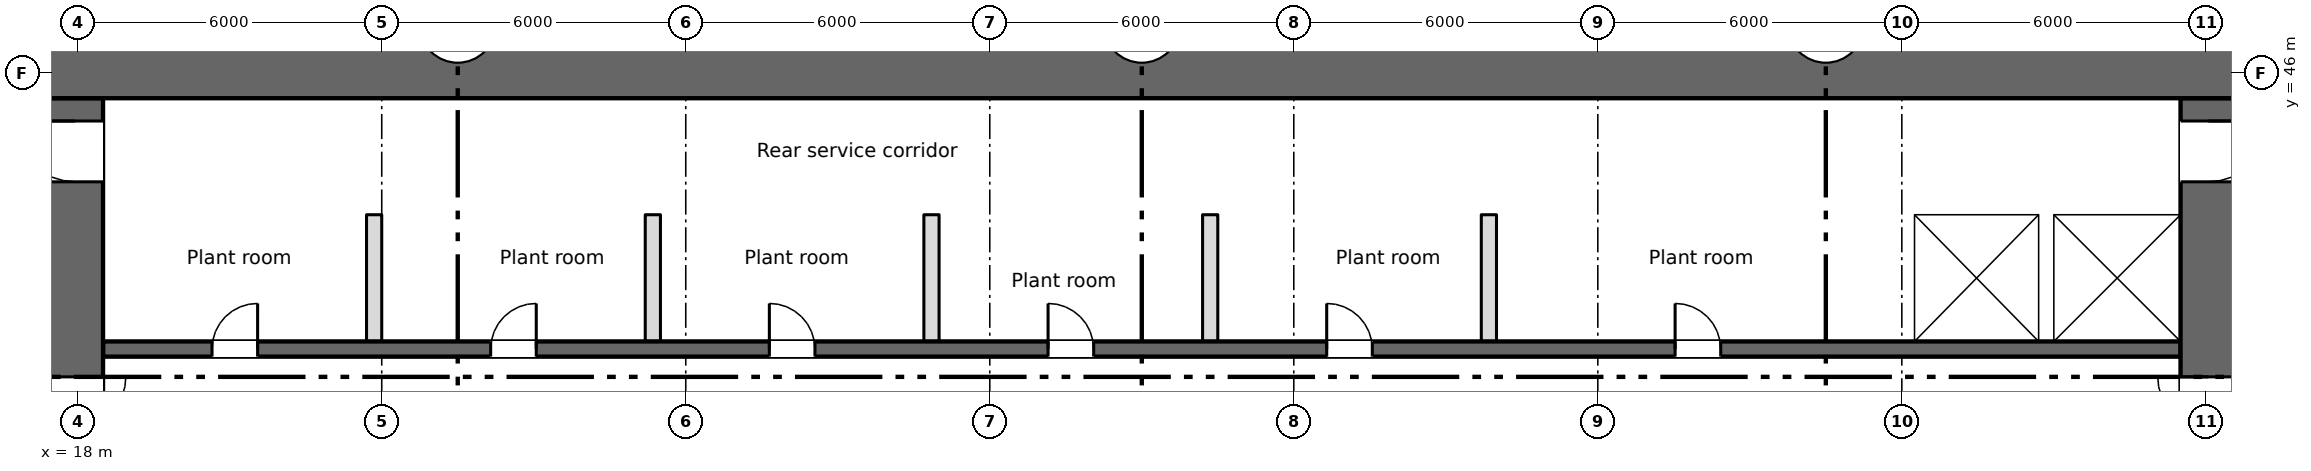
"""IFC4 building model, lengths in metres.
Left out: names, types, materials, properties, quantities, classifications, styles, units other than length and angle.
Written with IfcOpenShell. Run it as: python <this file> out.ifc"""

import sys

from ifc_helpers import new_model, si_unit, direction, frame, frame_2d, origin, place, context, subcontext, project, spatial, rectangle, extrude, element, fill, save


model = new_model("IFC4")
c1 = context("Model", 3, precision=1e-05, world=origin(), true_north=direction((0.0, 1.0)))
c2 = subcontext(c1, "Body", "Model", "MODEL_VIEW")
j1 = project(units=[si_unit("LENGTHUNIT", "METRE"), si_unit("PLANEANGLEUNIT", "RADIAN")], contexts=[c1])
p1 = place(None, origin())
s1 = spatial("IfcSite", under=j1, at=p1, CompositionType="ELEMENT")
p2 = place(p1, origin())
s2 = spatial("IfcBuilding", under=s1, at=p2, CompositionType="ELEMENT")
p3 = place(p2, frame((0.0, 0.0, -6.0)))
s3 = spatial("IfcBuildingStorey", under=s2, at=p3, CompositionType="ELEMENT", Elevation=-6.0)
p4 = place(p3, frame((-2.0, 46.0, 0.0), z_axis=(0.0, 0.0, 1.0), x_axis=(1.0, 0.0, 0.0)))
e1 = element("IfcWall", 1, at=p4, inside=s3, PredefinedType="SOLIDWALL", context=c2, shape_type="SweptSolid", body=[
    extrude(rectangle(XDim=82.0, YDim=1.0, at=frame_2d((41.0, 0.0))), origin(), (0.0, 0.0, 1.0), 5.55),
])
p5 = place(p3, frame((17.95, 28.4, 0.0), z_axis=(0.0, 0.0, 1.0), x_axis=(0.0, 1.0, 0.0)))
e2 = element("IfcWall", 2, at=p5, inside=s3, PredefinedType="SHEAR", context=c2, shape_type="SweptSolid", body=[
    extrude(rectangle(XDim=17.1, YDim=1.1, at=frame_2d((8.55, 0.0))), origin(), (0.0, 0.0, 1.0), 5.55),
])
p6 = place(p5, frame((9.6, 0.0, 0.0)))
e3 = element("IfcOpeningElement", 3, at=p6, cuts=e2, PredefinedType="OPENING", context=c2, shape_type="SweptSolid", body=[
    extrude(rectangle(XDim=2.0, YDim=2.1, at=frame_2d((1.0, 1.05))), frame((0.0, 0.56, 0.0), z_axis=(0.0, -1.0, 0.0), x_axis=(1.0, 0.0, 0.0)), (0.0, 0.0, 1.0), 1.12),
])
p7 = place(p5, frame((15.45, 0.0, 0.0)))
e4 = element("IfcOpeningElement", 4, at=p7, cuts=e2, PredefinedType="OPENING", context=c2, shape_type="SweptSolid", body=[
    extrude(rectangle(XDim=1.2, YDim=2.1, at=frame_2d((0.6, 1.05))), frame((0.0, 0.56, 0.0), z_axis=(0.0, -1.0, 0.0), x_axis=(1.0, 0.0, 0.0)), (0.0, 0.0, 1.0), 1.12),
])
p8 = place(p3, frame((60.05, 28.4, 0.0), z_axis=(0.0, 0.0, 1.0), x_axis=(0.0, 1.0, 0.0)))
e5 = element("IfcWall", 5, at=p8, inside=s3, PredefinedType="SHEAR", context=c2, shape_type="SweptSolid", body=[
    extrude(rectangle(XDim=17.1, YDim=1.1, at=frame_2d((8.55, 0.0))), origin(), (0.0, 0.0, 1.0), 5.55),
])
p9 = place(p8, frame((9.6, 0.0, 0.0)))
e6 = element("IfcOpeningElement", 6, at=p9, cuts=e5, PredefinedType="OPENING", context=c2, shape_type="SweptSolid", body=[
    extrude(rectangle(XDim=2.0, YDim=2.1, at=frame_2d((1.0, 1.05))), frame((0.0, 0.56, 0.0), z_axis=(0.0, -1.0, 0.0), x_axis=(1.0, 0.0, 0.0)), (0.0, 0.0, 1.0), 1.12),
])
p10 = place(p8, frame((15.45, 0.0, 0.0)))
e7 = element("IfcOpeningElement", 7, at=p10, cuts=e5, PredefinedType="OPENING", context=c2, shape_type="SweptSolid", body=[
    extrude(rectangle(XDim=1.2, YDim=2.1, at=frame_2d((0.6, 1.05))), frame((0.0, 0.56, 0.0), z_axis=(0.0, -1.0, 0.0), x_axis=(1.0, 0.0, 0.0)), (0.0, 0.0, 1.0), 1.12),
])
p11 = place(p3, frame((18.5, 40.55, 0.0), z_axis=(0.0, 0.0, 1.0), x_axis=(1.0, 0.0, 0.0)))
e8 = element("IfcWall", 8, at=p11, inside=s3, PredefinedType="SHEAR", context=c2, shape_type="SweptSolid", body=[
    extrude(rectangle(XDim=41.0, YDim=0.3, at=frame_2d((20.5, 0.0))), origin(), (0.0, 0.0, 1.0), 5.55),
])
p12 = place(p11, frame((2.15, 0.0, 0.0)))
e9 = element("IfcOpeningElement", 9, at=p12, cuts=e8, PredefinedType="OPENING", context=c2, shape_type="SweptSolid", body=[
    extrude(rectangle(XDim=0.9, YDim=2.1, at=frame_2d((0.45, 1.05))), frame((0.0, 0.16, 0.0), z_axis=(0.0, -1.0, 0.0), x_axis=(1.0, 0.0, 0.0)), (0.0, 0.0, 1.0), 0.32),
])
p13 = place(p11, frame((7.65, 0.0, 0.0)))
e10 = element("IfcOpeningElement", 10, at=p13, cuts=e8, PredefinedType="OPENING", context=c2, shape_type="SweptSolid", body=[
    extrude(rectangle(XDim=0.9, YDim=2.1, at=frame_2d((0.45, 1.05))), frame((0.0, 0.16, 0.0), z_axis=(0.0, -1.0, 0.0), x_axis=(1.0, 0.0, 0.0)), (0.0, 0.0, 1.0), 0.32),
])
p14 = place(p11, frame((13.15, 0.0, 0.0)))
e11 = element("IfcOpeningElement", 11, at=p14, cuts=e8, PredefinedType="OPENING", context=c2, shape_type="SweptSolid", body=[
    extrude(rectangle(XDim=0.9, YDim=2.1, at=frame_2d((0.45, 1.05))), frame((0.0, 0.16, 0.0), z_axis=(0.0, -1.0, 0.0), x_axis=(1.0, 0.0, 0.0)), (0.0, 0.0, 1.0), 0.32),
])
p15 = place(p11, frame((18.65, 0.0, 0.0)))
e12 = element("IfcOpeningElement", 12, at=p15, cuts=e8, PredefinedType="OPENING", context=c2, shape_type="SweptSolid", body=[
    extrude(rectangle(XDim=0.9, YDim=2.1, at=frame_2d((0.45, 1.05))), frame((0.0, 0.16, 0.0), z_axis=(0.0, -1.0, 0.0), x_axis=(1.0, 0.0, 0.0)), (0.0, 0.0, 1.0), 0.32),
])
p16 = place(p11, frame((24.15, 0.0, 0.0)))
e13 = element("IfcOpeningElement", 13, at=p16, cuts=e8, PredefinedType="OPENING", context=c2, shape_type="SweptSolid", body=[
    extrude(rectangle(XDim=0.9, YDim=2.1, at=frame_2d((0.45, 1.05))), frame((0.0, 0.16, 0.0), z_axis=(0.0, -1.0, 0.0), x_axis=(1.0, 0.0, 0.0)), (0.0, 0.0, 1.0), 0.32),
])
p17 = place(p11, frame((31.025, 0.0, 0.0)))
e14 = element("IfcOpeningElement", 14, at=p17, cuts=e8, PredefinedType="OPENING", context=c2, shape_type="SweptSolid", body=[
    extrude(rectangle(XDim=0.9, YDim=2.1, at=frame_2d((0.45, 1.05))), frame((0.0, 0.16, 0.0), z_axis=(0.0, -1.0, 0.0), x_axis=(1.0, 0.0, 0.0)), (0.0, 0.0, 1.0), 0.32),
])
p18 = place(p11, frame((36.375, 0.0, 0.0)))
e15 = element("IfcOpeningElement", 15, at=p18, cuts=e8, PredefinedType="OPENING", context=c2, shape_type="SweptSolid", body=[
    extrude(rectangle(XDim=1.2, YDim=2.1, at=frame_2d((0.6, 1.05))), frame((0.0, 0.16, 0.0), z_axis=(0.0, -1.0, 0.0), x_axis=(1.0, 0.0, 0.0)), (0.0, 0.0, 1.0), 0.32),
])
p19 = place(p11, frame((39.15, 0.0, 0.0)))
e16 = element("IfcOpeningElement", 16, at=p19, cuts=e8, PredefinedType="OPENING", context=c2, shape_type="SweptSolid", body=[
    extrude(rectangle(XDim=1.2, YDim=2.1, at=frame_2d((0.6, 1.05))), frame((0.0, 0.16, 0.0), z_axis=(0.0, -1.0, 0.0), x_axis=(1.0, 0.0, 0.0)), (0.0, 0.0, 1.0), 0.32),
])
p20 = place(p3, frame((18.5, 43.35, 0.0), z_axis=(0.0, 0.0, 1.0), x_axis=(1.0, 0.0, 0.0)))
e17 = element("IfcWall", 17, at=p20, inside=s3, PredefinedType="SHEAR", context=c2, shape_type="SweptSolid", body=[
    extrude(rectangle(XDim=41.0, YDim=0.3, at=frame_2d((20.5, 0.0))), origin(), (0.0, 0.0, 1.0), 5.55),
])
for number, where, z_axis, x_axis in (
    (18, (54.1, 40.7, 0.0), (0.0, 0.0, 1.0), (0.0, 1.0, 0.0)),
    (19, (56.85, 40.7, 0.0), (0.0, 0.0, 1.0), (0.0, 1.0, 0.0)),
):
    element("IfcWall", number, at=place(p3, frame(where, z_axis=z_axis, x_axis=x_axis)), inside=s3, PredefinedType="SHEAR", context=c2, shape_type="SweptSolid", body=[
        extrude(rectangle(XDim=2.5, YDim=0.3, at=frame_2d((1.25, 0.0))), origin(), (0.0, 0.0, 1.0), 5.55),
    ])
for number, where, z_axis, x_axis in (
    (20, (23.85, 40.7, 0.0), (0.0, 0.0, 1.0), (0.0, 1.0, 0.0)),
    (21, (29.35, 40.7, 0.0), (0.0, 0.0, 1.0), (0.0, 1.0, 0.0)),
    (22, (34.85, 40.7, 0.0), (0.0, 0.0, 1.0), (0.0, 1.0, 0.0)),
    (23, (40.35, 40.7, 0.0), (0.0, 0.0, 1.0), (0.0, 1.0, 0.0)),
    (24, (45.85, 40.7, 0.0), (0.0, 0.0, 1.0), (0.0, 1.0, 0.0)),
):
    element("IfcWall", number, at=place(p3, frame(where, z_axis=z_axis, x_axis=x_axis)), inside=s3, PredefinedType="PARTITIONING", context=c2, shape_type="SweptSolid", body=[
        extrude(rectangle(XDim=2.5, YDim=0.3, at=frame_2d((1.25, 0.0))), origin(), (0.0, 0.0, 1.0), 5.55),
    ])
p21 = place(p12, origin())
e25 = element("IfcDoor", 25, at=p21, inside=s3, OperationType="SINGLE_SWING_RIGHT", PredefinedType="DOOR", context=c2, shape_type="SweptSolid", body=[
    extrude(rectangle(XDim=0.9, YDim=2.1, at=frame_2d((0.45, 1.05))), frame((0.0, 0.025, 0.0), z_axis=(0.0, -1.0, 0.0), x_axis=(1.0, 0.0, 0.0)), (0.0, 0.0, 1.0), 0.05),
])
fill(e9, e25)
p22 = place(p13, origin())
e26 = element("IfcDoor", 26, at=p22, inside=s3, OperationType="SINGLE_SWING_RIGHT", PredefinedType="DOOR", context=c2, shape_type="SweptSolid", body=[
    extrude(rectangle(XDim=0.9, YDim=2.1, at=frame_2d((0.45, 1.05))), frame((0.0, 0.025, 0.0), z_axis=(0.0, -1.0, 0.0), x_axis=(1.0, 0.0, 0.0)), (0.0, 0.0, 1.0), 0.05),
])
fill(e10, e26)
p23 = place(p14, origin())
e27 = element("IfcDoor", 27, at=p23, inside=s3, OperationType="SINGLE_SWING_LEFT", PredefinedType="DOOR", context=c2, shape_type="SweptSolid", body=[
    extrude(rectangle(XDim=0.9, YDim=2.1, at=frame_2d((0.45, 1.05))), frame((0.0, 0.025, 0.0), z_axis=(0.0, -1.0, 0.0), x_axis=(1.0, 0.0, 0.0)), (0.0, 0.0, 1.0), 0.05),
])
fill(e11, e27)
p24 = place(p15, origin())
e28 = element("IfcDoor", 28, at=p24, inside=s3, OperationType="SINGLE_SWING_LEFT", PredefinedType="DOOR", context=c2, shape_type="SweptSolid", body=[
    extrude(rectangle(XDim=0.9, YDim=2.1, at=frame_2d((0.45, 1.05))), frame((0.0, 0.025, 0.0), z_axis=(0.0, -1.0, 0.0), x_axis=(1.0, 0.0, 0.0)), (0.0, 0.0, 1.0), 0.05),
])
fill(e12, e28)
p25 = place(p16, origin())
e29 = element("IfcDoor", 29, at=p25, inside=s3, OperationType="SINGLE_SWING_LEFT", PredefinedType="DOOR", context=c2, shape_type="SweptSolid", body=[
    extrude(rectangle(XDim=0.9, YDim=2.1, at=frame_2d((0.45, 1.05))), frame((0.0, 0.025, 0.0), z_axis=(0.0, -1.0, 0.0), x_axis=(1.0, 0.0, 0.0)), (0.0, 0.0, 1.0), 0.05),
])
fill(e13, e29)
p26 = place(p17, origin())
e30 = element("IfcDoor", 30, at=p26, inside=s3, OperationType="SINGLE_SWING_LEFT", PredefinedType="DOOR", context=c2, shape_type="SweptSolid", body=[
    extrude(rectangle(XDim=0.9, YDim=2.1, at=frame_2d((0.45, 1.05))), frame((0.0, 0.025, 0.0), z_axis=(0.0, -1.0, 0.0), x_axis=(1.0, 0.0, 0.0)), (0.0, 0.0, 1.0), 0.05),
])
fill(e14, e30)
p27 = place(p18, origin())
e31 = element("IfcDoor", 31, at=p27, inside=s3, OperationType="SLIDING_TO_LEFT", PredefinedType="DOOR", context=c2, shape_type="SweptSolid", body=[
    extrude(rectangle(XDim=1.2, YDim=2.1, at=frame_2d((0.6, 1.05))), frame((0.0, 0.025, 0.0), z_axis=(0.0, -1.0, 0.0), x_axis=(1.0, 0.0, 0.0)), (0.0, 0.0, 1.0), 0.05),
])
fill(e15, e31)
p28 = place(p19, origin())
e32 = element("IfcDoor", 32, at=p28, inside=s3, OperationType="SLIDING_TO_LEFT", PredefinedType="DOOR", context=c2, shape_type="SweptSolid", body=[
    extrude(rectangle(XDim=1.2, YDim=2.1, at=frame_2d((0.6, 1.05))), frame((0.0, 0.025, 0.0), z_axis=(0.0, -1.0, 0.0), x_axis=(1.0, 0.0, 0.0)), (0.0, 0.0, 1.0), 0.05),
])
fill(e16, e32)
p29 = place(p6, origin())
e33 = element("IfcDoor", 33, at=p29, inside=s3, OperationType="DOUBLE_DOOR_SINGLE_SWING", PredefinedType="DOOR", context=c2, shape_type="SweptSolid", body=[
    extrude(rectangle(XDim=2.0, YDim=2.1, at=frame_2d((1.0, 1.05))), frame((0.0, 0.025, 0.0), z_axis=(0.0, -1.0, 0.0), x_axis=(1.0, 0.0, 0.0)), (0.0, 0.0, 1.0), 0.05),
])
fill(e3, e33)
p30 = place(p9, origin())
e34 = element("IfcDoor", 34, at=p30, inside=s3, OperationType="DOUBLE_DOOR_SINGLE_SWING", PredefinedType="DOOR", context=c2, shape_type="SweptSolid", body=[
    extrude(rectangle(XDim=2.0, YDim=2.1, at=frame_2d((1.0, 1.05))), frame((0.0, 0.025, 0.0), z_axis=(0.0, -1.0, 0.0), x_axis=(1.0, 0.0, 0.0)), (0.0, 0.0, 1.0), 0.05),
])
fill(e6, e34)
p31 = place(p7, origin())
e35 = element("IfcDoor", 35, at=p31, inside=s3, OperationType="SINGLE_SWING_RIGHT", PredefinedType="DOOR", context=c2, shape_type="SweptSolid", body=[
    extrude(rectangle(XDim=1.2, YDim=2.1, at=frame_2d((0.6, 1.05))), frame((0.0, 0.025, 0.0), z_axis=(0.0, -1.0, 0.0), x_axis=(1.0, 0.0, 0.0)), (0.0, 0.0, 1.0), 0.05),
])
fill(e4, e35)
p32 = place(p10, origin())
e36 = element("IfcDoor", 36, at=p32, inside=s3, OperationType="SINGLE_SWING_RIGHT", PredefinedType="DOOR", context=c2, shape_type="SweptSolid", body=[
    extrude(rectangle(XDim=1.2, YDim=2.1, at=frame_2d((0.6, 1.05))), frame((0.0, 0.025, 0.0), z_axis=(0.0, -1.0, 0.0), x_axis=(1.0, 0.0, 0.0)), (0.0, 0.0, 1.0), 0.05),
])
fill(e7, e36)
save(model, sys.argv[1])
